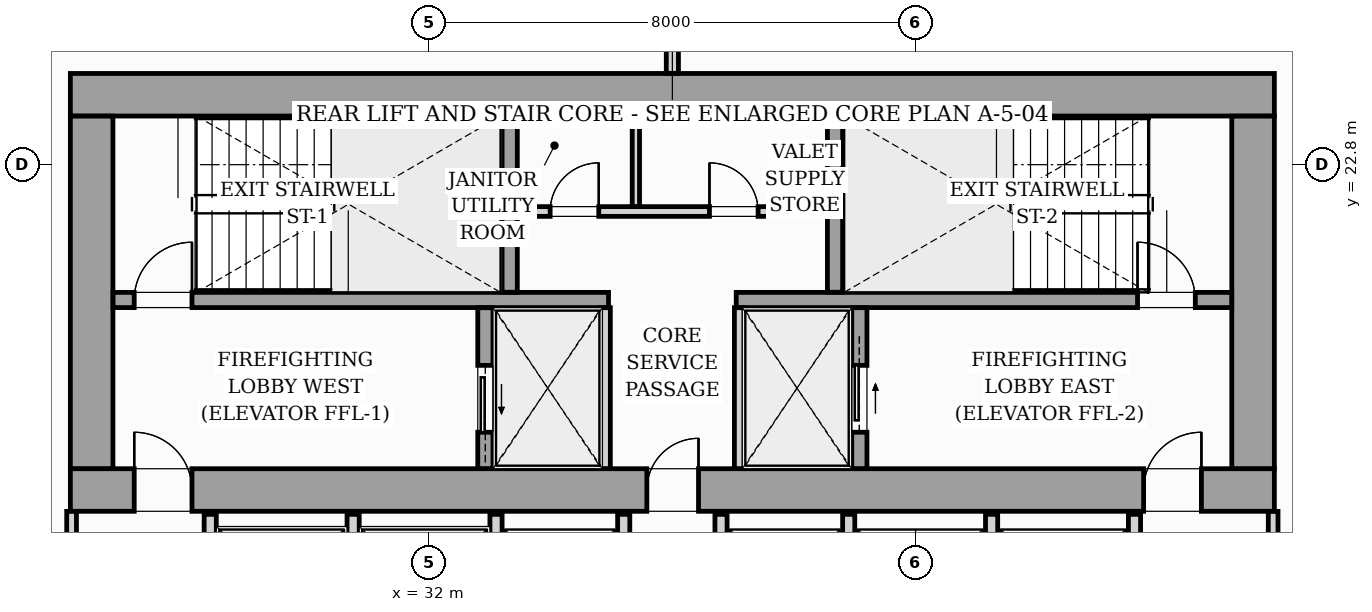
"""IFC4 building model, lengths in metres.
Left out: names, types, materials, properties, quantities, classifications, styles, units other than length and angle.
Written with IfcOpenShell. Run it as: python <this file> out.ifc"""

import sys

from ifc_helpers import new_model, si_unit, direction, frame, frame_2d, origin, origin_2d, place, context, subcontext, project, spatial, rectangle, i_section, extrude, source, transform, mapped, element, fill, save


model = new_model("IFC4")
c1 = context("Model", 3, precision=1e-05, world=origin(), true_north=direction((0.0, 1.0)))
c2 = subcontext(c1, "Body", "Model", "MODEL_VIEW")
j1 = project(units=[si_unit("LENGTHUNIT", "METRE"), si_unit("PLANEANGLEUNIT", "RADIAN")], contexts=[c1])
p1 = place(None, origin())
s1 = spatial("IfcSite", under=j1, at=p1, CompositionType="ELEMENT")
p2 = place(p1, origin())
s2 = spatial("IfcBuilding", under=s1, at=p2, CompositionType="ELEMENT")
p3 = place(p2, frame((0.0, 0.0, 87.4)))
s3 = spatial("IfcBuildingStorey", under=s2, at=p3, CompositionType="ELEMENT", Elevation=87.4)
m1 = source(origin(), c2, "Body", "SweptSolid", [
    extrude(i_section(OverallWidth=0.427, OverallDepth=0.483, WebThickness=0.051, FlangeThickness=0.082, FilletRadius=0.018, at=origin_2d()), origin(), (0.0, 0.0, 1.0), 3.196),
])
for number, where, z_axis, x_axis in (
    (1, (26.4, 17.4, 0.002), (0.0, 0.0, 1.0), (1.0, 0.0, 0.0)),
    (2, (33.12, 17.4, 0.002), (0.0, 0.0, 1.0), (1.0, 0.0, 0.0)),
    (3, (38.88, 17.4, 0.002), (0.0, 0.0, 1.0), (1.0, 0.0, 0.0)),
    (4, (45.6, 17.4, 0.002), (0.0, 0.0, 1.0), (1.0, 0.0, 0.0)),
    (5, (26.4, 24.0, 0.002), (0.0, 0.0, 1.0), (1.0, 0.0, 0.0)),
    (6, (33.12, 24.0, 0.002), (0.0, 0.0, 1.0), (1.0, 0.0, 0.0)),
    (7, (38.88, 24.0, 0.002), (0.0, 0.0, 1.0), (1.0, 0.0, 0.0)),
    (8, (45.6, 24.0, 0.002), (0.0, 0.0, 1.0), (1.0, 0.0, 0.0)),
):
    element("IfcColumn", number, at=place(p3, frame(where, z_axis=z_axis, x_axis=x_axis)), inside=s3, PredefinedType="PILASTER", context=c2, shape_type="MappedRepresentation", body=[
        mapped(m1, transform((0.0, 0.0, 0.0), scale=1.0)),
    ])
p4 = place(p3, frame((11.08, 23.508, 0.0), z_axis=(0.0, 0.0, 1.0), x_axis=(0.995396638587, 0.095841180552, 0.0)))
e9 = element("IfcWall", 9, at=p4, inside=s3, PredefinedType="STANDARD", context=c2, shape_type="SweptSolid", body=[
    extrude(rectangle(XDim=19.11, YDim=0.26, at=frame_2d((9.555, 0.0))), origin(), (0.0, 0.0, 1.0), 2.94),
])
p5 = place(p4, frame((8.303, 0.0, 0.0)))
e10 = element("IfcOpeningElement", 10, at=p5, cuts=e9, PredefinedType="OPENING", context=c2, shape_type="SweptSolid", body=[
    extrude(rectangle(XDim=1.8, YDim=2.06, at=frame_2d((0.9, 1.03))), frame((0.0, 0.14, 0.0), z_axis=(0.0, -1.0, 0.0), x_axis=(1.0, 0.0, 0.0)), (0.0, 0.0, 1.0), 0.28),
])
p6 = place(p4, frame((2.05, 0.0, 0.65)))
e11 = element("IfcOpeningElement", 11, at=p6, cuts=e9, PredefinedType="OPENING", context=c2, shape_type="SweptSolid", body=[
    extrude(rectangle(XDim=1.6, YDim=1.5, at=frame_2d((0.8, 0.75))), frame((0.0, 0.14, 0.0), z_axis=(0.0, -1.0, 0.0), x_axis=(1.0, 0.0, 0.0)), (0.0, 0.0, 1.0), 0.28),
])
p7 = place(p3, frame((26.1, 17.45, 0.0), z_axis=(0.0, 0.0, 1.0), x_axis=(1.0, 0.0, 0.0)))
e12 = element("IfcWall", 12, at=p7, inside=s3, PredefinedType="SHEAR", context=c2, shape_type="SweptSolid", body=[
    extrude(rectangle(XDim=19.8, YDim=0.7, at=frame_2d((9.9, 0.0))), origin(), (0.0, 0.0, 1.0), 3.2),
])
p8 = place(p7, frame((1.05, 0.0, 0.0)))
e13 = element("IfcOpeningElement", 13, at=p8, cuts=e12, PredefinedType="OPENING", context=c2, shape_type="SweptSolid", body=[
    extrude(rectangle(XDim=0.95, YDim=2.06, at=frame_2d((0.475, 1.03))), frame((0.0, 0.36, 0.0), z_axis=(0.0, -1.0, 0.0), x_axis=(1.0, 0.0, 0.0)), (0.0, 0.0, 1.0), 0.72),
])
p9 = place(p7, frame((9.48, 0.0, 0.0)))
e14 = element("IfcOpeningElement", 14, at=p9, cuts=e12, PredefinedType="OPENING", context=c2, shape_type="SweptSolid", body=[
    extrude(rectangle(XDim=0.85, YDim=2.0, at=frame_2d((0.425, 1.0))), frame((0.0, 0.36, 0.0), z_axis=(0.0, -1.0, 0.0), x_axis=(1.0, 0.0, 0.0)), (0.0, 0.0, 1.0), 0.72),
])
p10 = place(p7, frame((17.65, 0.0, 0.0)))
e15 = element("IfcOpeningElement", 15, at=p10, cuts=e12, PredefinedType="OPENING", context=c2, shape_type="SweptSolid", body=[
    extrude(rectangle(XDim=0.95, YDim=2.06, at=frame_2d((0.475, 1.03))), frame((0.0, 0.36, 0.0), z_axis=(0.0, -1.0, 0.0), x_axis=(1.0, 0.0, 0.0)), (0.0, 0.0, 1.0), 0.72),
])
p11 = place(p3, frame((26.1, 23.95, 0.0), z_axis=(0.0, 0.0, 1.0), x_axis=(1.0, 0.0, 0.0)))
e16 = element("IfcWall", 16, at=p11, inside=s3, PredefinedType="SHEAR", context=c2, shape_type="SweptSolid", body=[
    extrude(rectangle(XDim=19.8, YDim=0.7, at=frame_2d((9.9, 0.0))), origin(), (0.0, 0.0, 1.0), 3.2),
])
for number, where, z_axis, x_axis in (
    (17, (26.45, 17.802, 0.0), (0.0, 0.0, 1.0), (0.0, 1.0, 0.0)),
    (18, (45.55, 17.802, 0.0), (0.0, 0.0, 1.0), (0.0, 1.0, 0.0)),
):
    element("IfcWall", number, at=place(p3, frame(where, z_axis=z_axis, x_axis=x_axis)), inside=s3, PredefinedType="SHEAR", context=c2, shape_type="SweptSolid", body=[
        extrude(rectangle(XDim=5.796, YDim=0.7, at=frame_2d((2.898, 0.0))), origin(), (0.0, 0.0, 1.0), 3.2),
    ])
p12 = place(p3, frame((26.802, 20.575, 0.0), z_axis=(0.0, 0.0, 1.0), x_axis=(1.0, 0.0, 0.0)))
e19 = element("IfcWall", 19, at=p12, inside=s3, PredefinedType="SOLIDWALL", context=c2, shape_type="SweptSolid", body=[
    extrude(rectangle(XDim=8.148, YDim=0.25, at=frame_2d((4.074, 0.0))), origin(), (0.0, 0.0, 1.0), 3.2),
])
p13 = place(p12, frame((0.348, 0.0, 0.0)))
e20 = element("IfcOpeningElement", 20, at=p13, cuts=e19, PredefinedType="OPENING", context=c2, shape_type="SweptSolid", body=[
    extrude(rectangle(XDim=0.95, YDim=2.06, at=frame_2d((0.475, 1.03))), frame((0.0, 0.135, 0.0), z_axis=(0.0, -1.0, 0.0), x_axis=(1.0, 0.0, 0.0)), (0.0, 0.0, 1.0), 0.27),
])
p14 = place(p3, frame((37.05, 20.575, 0.0), z_axis=(0.0, 0.0, 1.0), x_axis=(1.0, 0.0, 0.0)))
e21 = element("IfcWall", 21, at=p14, inside=s3, PredefinedType="SOLIDWALL", context=c2, shape_type="SweptSolid", body=[
    extrude(rectangle(XDim=8.148, YDim=0.25, at=frame_2d((4.074, 0.0))), origin(), (0.0, 0.0, 1.0), 3.2),
])
p15 = place(p14, frame((6.6, 0.0, 0.0)))
e22 = element("IfcOpeningElement", 22, at=p15, cuts=e21, PredefinedType="OPENING", context=c2, shape_type="SweptSolid", body=[
    extrude(rectangle(XDim=0.95, YDim=2.06, at=frame_2d((0.475, 1.03))), frame((0.0, 0.135, 0.0), z_axis=(0.0, -1.0, 0.0), x_axis=(1.0, 0.0, 0.0)), (0.0, 0.0, 1.0), 0.27),
])
for number, where, z_axis, x_axis in (
    (23, (33.325, 20.702, 0.0), (0.0, 0.0, 1.0), (0.0, 1.0, 0.0)),
    (24, (38.675, 20.702, 0.0), (0.0, 0.0, 1.0), (0.0, 1.0, 0.0)),
):
    element("IfcWall", number, at=place(p3, frame(where, z_axis=z_axis, x_axis=x_axis)), inside=s3, PredefinedType="SOLIDWALL", context=c2, shape_type="SweptSolid", body=[
        extrude(rectangle(XDim=2.896, YDim=0.25, at=frame_2d((1.448, 0.0))), origin(), (0.0, 0.0, 1.0), 3.2),
    ])
p16 = place(p3, frame((32.925, 17.802, 0.0), z_axis=(0.0, 0.0, 1.0), x_axis=(0.0, 1.0, 0.0)))
e25 = element("IfcWall", 25, at=p16, inside=s3, PredefinedType="SOLIDWALL", context=c2, shape_type="SweptSolid", body=[
    extrude(rectangle(XDim=2.646, YDim=0.25, at=frame_2d((1.323, 0.0))), origin(), (0.0, 0.0, 1.0), 3.2),
])
p17 = place(p16, frame((0.598, 0.0, 0.0)))
e26 = element("IfcOpeningElement", 26, at=p17, cuts=e25, PredefinedType="OPENING", context=c2, shape_type="SweptSolid", body=[
    extrude(rectangle(XDim=1.1, YDim=2.08, at=frame_2d((0.55, 1.04))), frame((0.0, 0.135, 0.0), z_axis=(0.0, -1.0, 0.0), x_axis=(1.0, 0.0, 0.0)), (0.0, 0.0, 1.0), 0.27),
])
for number, where, z_axis, x_axis in (
    (27, (34.9, 17.802, 0.0), (0.0, 0.0, 1.0), (0.0, 1.0, 0.0)),
    (28, (37.1, 17.802, 0.0), (0.0, 0.0, 1.0), (0.0, 1.0, 0.0)),
):
    element("IfcWall", number, at=place(p3, frame(where, z_axis=z_axis, x_axis=x_axis)), inside=s3, PredefinedType="PARTITIONING", context=c2, shape_type="SweptSolid", body=[
        extrude(rectangle(XDim=2.646, YDim=0.16, at=frame_2d((1.323, 0.0))), origin(), (0.0, 0.0, 1.0), 2.94),
    ])
p18 = place(p3, frame((39.075, 17.802, 0.0), z_axis=(0.0, 0.0, 1.0), x_axis=(0.0, 1.0, 0.0)))
e29 = element("IfcWall", 29, at=p18, inside=s3, PredefinedType="SOLIDWALL", context=c2, shape_type="SweptSolid", body=[
    extrude(rectangle(XDim=2.646, YDim=0.25, at=frame_2d((1.323, 0.0))), origin(), (0.0, 0.0, 1.0), 3.2),
])
p19 = place(p18, frame((0.598, 0.0, 0.0)))
e30 = element("IfcOpeningElement", 30, at=p19, cuts=e29, PredefinedType="OPENING", context=c2, shape_type="SweptSolid", body=[
    extrude(rectangle(XDim=1.1, YDim=2.08, at=frame_2d((0.55, 1.04))), frame((0.0, 0.135, 0.0), z_axis=(0.0, -1.0, 0.0), x_axis=(1.0, 0.0, 0.0)), (0.0, 0.0, 1.0), 0.27),
])
p20 = place(p3, frame((33.452, 22.03, 0.0), z_axis=(0.0, 0.0, 1.0), x_axis=(1.0, 0.0, 0.0)))
e31 = element("IfcWall", 31, at=p20, inside=s3, PredefinedType="PARTITIONING", context=c2, shape_type="SweptSolid", body=[
    extrude(rectangle(XDim=5.096, YDim=0.16, at=frame_2d((2.548, 0.0))), origin(), (0.0, 0.0, 1.0), 2.94),
])
p21 = place(p20, frame((0.538, 0.0, 0.0)))
e32 = element("IfcOpeningElement", 32, at=p21, cuts=e31, PredefinedType="OPENING", context=c2, shape_type="SweptSolid", body=[
    extrude(rectangle(XDim=0.8, YDim=2.05, at=frame_2d((0.4, 1.025))), frame((0.0, 0.09, 0.0), z_axis=(0.0, -1.0, 0.0), x_axis=(1.0, 0.0, 0.0)), (0.0, 0.0, 1.0), 0.18),
])
p22 = place(p20, frame((3.158, 0.0, 0.0)))
e33 = element("IfcOpeningElement", 33, at=p22, cuts=e31, PredefinedType="OPENING", context=c2, shape_type="SweptSolid", body=[
    extrude(rectangle(XDim=0.8, YDim=2.05, at=frame_2d((0.4, 1.025))), frame((0.0, 0.09, 0.0), z_axis=(0.0, -1.0, 0.0), x_axis=(1.0, 0.0, 0.0)), (0.0, 0.0, 1.0), 0.18),
])
p23 = place(p3, frame((35.4, 22.112, 0.0), z_axis=(0.0, 0.0, 1.0), x_axis=(0.0, 1.0, 0.0)))
e34 = element("IfcWall", 34, at=p23, inside=s3, PredefinedType="PARTITIONING", context=c2, shape_type="SweptSolid", body=[
    extrude(rectangle(XDim=1.486, YDim=0.12, at=frame_2d((0.743, 0.0))), origin(), (0.0, 0.0, 1.0), 2.94),
])
for number, where, z_axis, x_axis in (
    (35, (28.4, 14.75, 0.0), (0.0, 0.0, 1.0), (0.0, 1.0, 0.0)),
    (36, (30.75, 14.75, 0.0), (0.0, 0.0, 1.0), (0.0, 1.0, 0.0)),
    (37, (33.1, 14.75, 0.0), (0.0, 0.0, 1.0), (0.0, 1.0, 0.0)),
    (38, (35.2, 14.75, 0.0), (0.0, 0.0, 1.0), (0.0, 1.0, 0.0)),
    (39, (36.8, 14.75, 0.0), (0.0, 0.0, 1.0), (0.0, 1.0, 0.0)),
    (40, (38.9, 14.75, 0.0), (0.0, 0.0, 1.0), (0.0, 1.0, 0.0)),
    (41, (41.25, 14.75, 0.0), (0.0, 0.0, 1.0), (0.0, 1.0, 0.0)),
    (42, (43.6, 14.75, 0.0), (0.0, 0.0, 1.0), (0.0, 1.0, 0.0)),
):
    element("IfcWall", number, at=place(p3, frame(where, z_axis=z_axis, x_axis=x_axis)), inside=s3, PredefinedType="PARTITIONING", context=c2, shape_type="SweptSolid", body=[
        extrude(rectangle(XDim=2.3, YDim=0.2, at=frame_2d((1.15, 0.0))), origin(), (0.0, 0.0, 1.0), 2.94),
    ])
p24 = place(p3, frame((36.0, 24.302, 0.0), z_axis=(0.0, 0.0, 1.0), x_axis=(0.0, 1.0, 0.0)))
e43 = element("IfcWall", 43, at=p24, inside=s3, PredefinedType="PARTITIONING", context=c2, shape_type="SweptSolid", body=[
    extrude(rectangle(XDim=1.656, YDim=0.2, at=frame_2d((0.828, 0.0))), origin(), (0.0, 0.0, 1.0), 2.94),
])
for number, where, z_axis, x_axis in (
    (44, (26.12, 14.762, 0.0), (0.0, 0.0, 1.0), (0.0, 1.0, 0.0)),
    (45, (45.88, 14.762, 0.0), (0.0, 0.0, 1.0), (0.0, 1.0, 0.0)),
):
    element("IfcWall", number, at=place(p3, frame(where, z_axis=z_axis, x_axis=x_axis)), inside=s3, PredefinedType="PARTITIONING", context=c2, shape_type="SweptSolid", body=[
        extrude(rectangle(XDim=2.336, YDim=0.16, at=frame_2d((1.168, 0.0))), origin(), (0.0, 0.0, 1.0), 2.94),
    ])
m2 = source(origin(), c2, "Body", "SweptSolid", [
    extrude(rectangle(XDim=0.95, YDim=2.06, at=frame_2d((0.475, 1.03))), frame((0.0, 0.025, 0.0), z_axis=(0.0, -1.0, 0.0), x_axis=(1.0, 0.0, 0.0)), (0.0, 0.0, 1.0), 0.05),
])
p25 = place(p8, origin())
e46 = element("IfcDoor", 46, at=p25, inside=s3, OperationType="SINGLE_SWING_LEFT", PredefinedType="DOOR", context=c2, shape_type="MappedRepresentation", body=[
    mapped(m2, transform((0.0, 0.0, 0.0), scale=1.0)),
])
fill(e13, e46)
m3 = source(origin(), c2, "Body", "SweptSolid", [
    extrude(rectangle(XDim=0.85, YDim=2.0, at=frame_2d((0.425, 1.0))), frame((0.0, 0.025, 0.0), z_axis=(0.0, -1.0, 0.0), x_axis=(1.0, 0.0, 0.0)), (0.0, 0.0, 1.0), 0.05),
])
p26 = place(p9, origin())
e47 = element("IfcDoor", 47, at=p26, inside=s3, OperationType="SINGLE_SWING_RIGHT", PredefinedType="DOOR", context=c2, shape_type="MappedRepresentation", body=[
    mapped(m3, transform((0.0, 0.0, 0.0), scale=1.0)),
])
fill(e14, e47)
p27 = place(p10, origin())
e48 = element("IfcDoor", 48, at=p27, inside=s3, OperationType="SINGLE_SWING_RIGHT", PredefinedType="DOOR", context=c2, shape_type="MappedRepresentation", body=[
    mapped(m2, transform((0.0, 0.0, 0.0), scale=1.0)),
])
fill(e15, e48)
p28 = place(p13, origin())
e49 = element("IfcDoor", 49, at=p28, inside=s3, OperationType="SINGLE_SWING_RIGHT", PredefinedType="DOOR", context=c2, shape_type="MappedRepresentation", body=[
    mapped(m2, transform((0.0, 0.0, 0.0), scale=1.0)),
])
fill(e20, e49)
p29 = place(p15, origin())
e50 = element("IfcDoor", 50, at=p29, inside=s3, OperationType="SINGLE_SWING_LEFT", PredefinedType="DOOR", context=c2, shape_type="MappedRepresentation", body=[
    mapped(m2, transform((0.0, 0.0, 0.0), scale=1.0)),
])
fill(e22, e50)
m4 = source(origin(), c2, "Body", "SweptSolid", [
    extrude(rectangle(XDim=1.1, YDim=2.08, at=frame_2d((0.55, 1.04))), frame((0.0, 0.025, 0.0), z_axis=(0.0, -1.0, 0.0), x_axis=(1.0, 0.0, 0.0)), (0.0, 0.0, 1.0), 0.05),
])
p30 = place(p17, origin())
e51 = element("IfcDoor", 51, at=p30, inside=s3, OperationType="SLIDING_TO_LEFT", PredefinedType="DOOR", context=c2, shape_type="MappedRepresentation", body=[
    mapped(m4, transform((0.0, 0.0, 0.0), scale=1.0)),
])
fill(e26, e51)
p31 = place(p19, origin())
e52 = element("IfcDoor", 52, at=p31, inside=s3, OperationType="SLIDING_TO_RIGHT", PredefinedType="DOOR", context=c2, shape_type="MappedRepresentation", body=[
    mapped(m4, transform((0.0, 0.0, 0.0), scale=1.0)),
])
fill(e30, e52)
m5 = source(origin(), c2, "Body", "SweptSolid", [
    extrude(rectangle(XDim=0.8, YDim=2.05, at=frame_2d((0.4, 1.025))), frame((0.0, 0.025, 0.0), z_axis=(0.0, -1.0, 0.0), x_axis=(1.0, 0.0, 0.0)), (0.0, 0.0, 1.0), 0.05),
])
p32 = place(p21, origin())
e53 = element("IfcDoor", 53, at=p32, inside=s3, OperationType="SINGLE_SWING_RIGHT", PredefinedType="DOOR", context=c2, shape_type="MappedRepresentation", body=[
    mapped(m5, transform((0.0, 0.0, 0.0), scale=1.0)),
])
fill(e32, e53)
p33 = place(p22, origin())
e54 = element("IfcDoor", 54, at=p33, inside=s3, OperationType="SINGLE_SWING_LEFT", PredefinedType="DOOR", context=c2, shape_type="MappedRepresentation", body=[
    mapped(m5, transform((0.0, 0.0, 0.0), scale=1.0)),
])
fill(e33, e54)
save(model, sys.argv[1])
